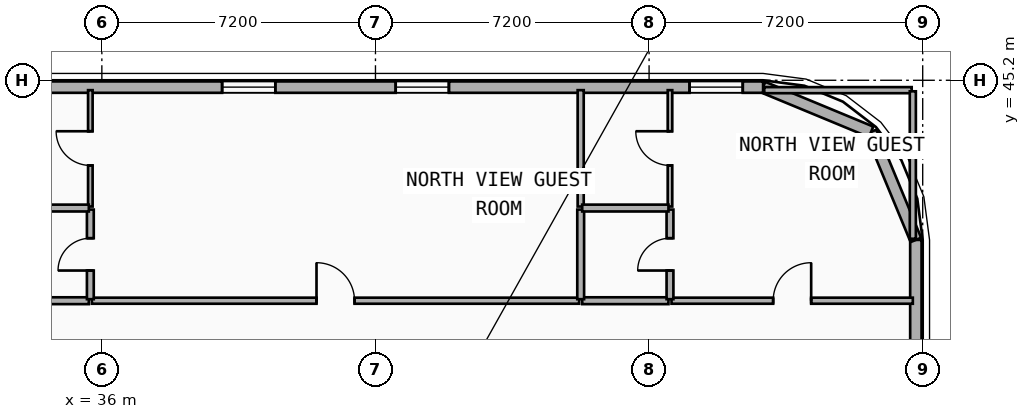
"""IFC4 building model, lengths in metres.
Left out: names, types, materials, properties, quantities, classifications, styles, units other than length and angle.
Written with IfcOpenShell. Run it as: python <this file> out.ifc"""

import sys

from ifc_helpers import new_model, si_unit, direction, frame, frame_2d, origin, place, context, subcontext, project, spatial, rectangle, extrude, element, fill, save


model = new_model("IFC4")
c1 = context("Model", 3, precision=1e-05, world=origin(), true_north=direction((0.0, 1.0)))
c2 = subcontext(c1, "Body", "Model", "MODEL_VIEW")
j1 = project(units=[si_unit("LENGTHUNIT", "METRE"), si_unit("PLANEANGLEUNIT", "RADIAN")], contexts=[c1])
p1 = place(None, origin())
s1 = spatial("IfcSite", under=j1, at=p1, CompositionType="ELEMENT")
p2 = place(p1, origin())
s2 = spatial("IfcBuilding", under=s1, at=p2, CompositionType="ELEMENT")
p3 = place(p2, frame((0.0, 0.0, 53.5)))
s3 = spatial("IfcBuildingStorey", under=s2, at=p3, CompositionType="ELEMENT", Elevation=53.5)
p4 = place(p3, frame((57.42, 41.0, 0.0), z_axis=(0.0, 0.0, 1.0), x_axis=(0.0, -1.0, 0.0)))
e1 = element("IfcWall", 1, at=p4, inside=s3, PredefinedType="SOLIDWALL", context=c2, shape_type="SweptSolid", body=[
    extrude(rectangle(XDim=15.2, YDim=0.3, at=frame_2d((7.6, 0.0))), origin(), (0.0, 0.0, 1.0), 3.24),
])
p5 = place(p4, frame((10.882, 0.0, 0.48)))
e2 = element("IfcOpeningElement", 2, at=p5, cuts=e1, PredefinedType="OPENING", context=c2, shape_type="SweptSolid", body=[
    extrude(rectangle(XDim=1.4, YDim=1.8, at=frame_2d((0.7, 0.9))), frame((0.0, 0.16, 0.0), z_axis=(0.0, -1.0, 0.0), x_axis=(1.0, 0.0, 0.0)), (0.0, 0.0, 1.0), 0.32),
])
p6 = place(p4, frame((5.621, 0.0, 0.48)))
e3 = element("IfcOpeningElement", 3, at=p6, cuts=e1, PredefinedType="OPENING", context=c2, shape_type="SweptSolid", body=[
    extrude(rectangle(XDim=1.4, YDim=1.8, at=frame_2d((0.7, 0.9))), frame((0.0, 0.16, 0.0), z_axis=(0.0, -1.0, 0.0), x_axis=(1.0, 0.0, 0.0)), (0.0, 0.0, 1.0), 0.32),
])
p7 = place(p3, frame((56.243, 43.843, 0.0), z_axis=(0.0, 0.0, 1.0), x_axis=(0.382636798336, -0.92389884758, 0.0)))
e4 = element("IfcWall", 4, at=p7, inside=s3, PredefinedType="SOLIDWALL", context=c2, shape_type="SweptSolid", body=[
    extrude(rectangle(XDim=3.077, YDim=0.3, at=frame_2d((1.538, 0.0))), origin(), (0.0, 0.0, 1.0), 3.24),
])
p8 = place(p3, frame((53.4, 45.02, 0.0), z_axis=(0.0, 0.0, 1.0), x_axis=(0.923882414032, -0.382676475685, 0.0)))
e5 = element("IfcWall", 5, at=p8, inside=s3, PredefinedType="SOLIDWALL", context=c2, shape_type="SweptSolid", body=[
    extrude(rectangle(XDim=3.077, YDim=0.3, at=frame_2d((1.539, 0.0))), origin(), (0.0, 0.0, 1.0), 3.24),
])
p9 = place(p3, frame((4.2, 45.02, 0.0), z_axis=(0.0, 0.0, 1.0), x_axis=(1.0, 0.0, 0.0)))
e6 = element("IfcWall", 6, at=p9, inside=s3, PredefinedType="SOLIDWALL", context=c2, shape_type="SweptSolid", body=[
    extrude(rectangle(XDim=49.2, YDim=0.3, at=frame_2d((24.6, 0.0))), origin(), (0.0, 0.0, 1.0), 3.24),
])
p10 = place(p9, frame((8.99, 0.0, 0.85)))
e7 = element("IfcOpeningElement", 7, at=p10, cuts=e6, PredefinedType="OPENING", context=c2, shape_type="SweptSolid", body=[
    extrude(rectangle(XDim=1.4, YDim=1.8, at=frame_2d((0.7, 0.9))), frame((0.0, 0.16, 0.0), z_axis=(0.0, -1.0, 0.0), x_axis=(1.0, 0.0, 0.0)), (0.0, 0.0, 1.0), 0.32),
])
p11 = place(p9, frame((11.72, 0.0, 0.85)))
e8 = element("IfcOpeningElement", 8, at=p11, cuts=e6, PredefinedType="OPENING", context=c2, shape_type="SweptSolid", body=[
    extrude(rectangle(XDim=1.4, YDim=1.8, at=frame_2d((0.7, 0.9))), frame((0.0, 0.16, 0.0), z_axis=(0.0, -1.0, 0.0), x_axis=(1.0, 0.0, 0.0)), (0.0, 0.0, 1.0), 0.32),
])
p12 = place(p9, frame((19.499, 0.0, 0.85)))
e9 = element("IfcOpeningElement", 9, at=p12, cuts=e6, PredefinedType="OPENING", context=c2, shape_type="SweptSolid", body=[
    extrude(rectangle(XDim=1.4, YDim=1.8, at=frame_2d((0.7, 0.9))), frame((0.0, 0.16, 0.0), z_axis=(0.0, -1.0, 0.0), x_axis=(1.0, 0.0, 0.0)), (0.0, 0.0, 1.0), 0.32),
])
p13 = place(p9, frame((22.998, 0.0, 0.85)))
e10 = element("IfcOpeningElement", 10, at=p13, cuts=e6, PredefinedType="OPENING", context=c2, shape_type="SweptSolid", body=[
    extrude(rectangle(XDim=1.4, YDim=1.8, at=frame_2d((0.7, 0.9))), frame((0.0, 0.16, 0.0), z_axis=(0.0, -1.0, 0.0), x_axis=(1.0, 0.0, 0.0)), (0.0, 0.0, 1.0), 0.32),
])
p14 = place(p9, frame((34.965, 0.0, 0.85)))
e11 = element("IfcOpeningElement", 11, at=p14, cuts=e6, PredefinedType="OPENING", context=c2, shape_type="SweptSolid", body=[
    extrude(rectangle(XDim=1.4, YDim=1.8, at=frame_2d((0.7, 0.9))), frame((0.0, 0.16, 0.0), z_axis=(0.0, -1.0, 0.0), x_axis=(1.0, 0.0, 0.0)), (0.0, 0.0, 1.0), 0.32),
])
p15 = place(p9, frame((39.532, 0.0, 0.85)))
e12 = element("IfcOpeningElement", 12, at=p15, cuts=e6, PredefinedType="OPENING", context=c2, shape_type="SweptSolid", body=[
    extrude(rectangle(XDim=1.4, YDim=1.8, at=frame_2d((0.7, 0.9))), frame((0.0, 0.16, 0.0), z_axis=(0.0, -1.0, 0.0), x_axis=(1.0, 0.0, 0.0)), (0.0, 0.0, 1.0), 0.32),
])
p16 = place(p9, frame((47.265, 0.0, 0.85)))
e13 = element("IfcOpeningElement", 13, at=p16, cuts=e6, PredefinedType="OPENING", context=c2, shape_type="SweptSolid", body=[
    extrude(rectangle(XDim=1.4, YDim=1.8, at=frame_2d((0.7, 0.9))), frame((0.0, 0.16, 0.0), z_axis=(0.0, -1.0, 0.0), x_axis=(1.0, 0.0, 0.0)), (0.0, 0.0, 1.0), 0.32),
])
p17 = place(p3, frame((35.737, 39.4, 0.0), z_axis=(0.0, 0.0, 1.0), x_axis=(1.0, 0.0, 0.0)))
e14 = element("IfcWall", 14, at=p17, inside=s3, PredefinedType="PARTITIONING", context=c2, shape_type="SweptSolid", body=[
    extrude(rectangle(XDim=12.823, YDim=0.16, at=frame_2d((6.412, 0.0))), origin(), (0.0, 0.0, 1.0), 3.24),
])
p18 = place(p17, frame((5.912, 0.0, 0.0)))
e15 = element("IfcOpeningElement", 15, at=p18, cuts=e14, PredefinedType="OPENING", context=c2, shape_type="SweptSolid", body=[
    extrude(rectangle(XDim=1.0, YDim=2.15, at=frame_2d((0.5, 1.075))), frame((0.0, 0.09, 0.0), z_axis=(0.0, -1.0, 0.0), x_axis=(1.0, 0.0, 0.0)), (0.0, 0.0, 1.0), 0.18),
])
p19 = place(p3, frame((33.387, 39.4, 0.0), z_axis=(0.0, 0.0, 1.0), x_axis=(1.0, 0.0, 0.0)))
e16 = element("IfcWall", 16, at=p19, inside=s3, PredefinedType="PLUMBINGWALL", context=c2, shape_type="SweptSolid", body=[
    extrude(rectangle(XDim=2.27, YDim=0.18, at=frame_2d((1.135, 0.0))), origin(), (0.0, 0.0, 1.0), 3.24),
])
p20 = place(p3, frame((50.99, 39.4, 0.0), z_axis=(0.0, 0.0, 1.0), x_axis=(1.0, 0.0, 0.0)))
e17 = element("IfcWall", 17, at=p20, inside=s3, PredefinedType="PARTITIONING", context=c2, shape_type="SweptSolid", body=[
    extrude(rectangle(XDim=6.35, YDim=0.16, at=frame_2d((3.175, 0.0))), origin(), (0.0, 0.0, 1.0), 3.24),
])
p21 = place(p20, frame((2.675, 0.0, 0.0)))
e18 = element("IfcOpeningElement", 18, at=p21, cuts=e17, PredefinedType="OPENING", context=c2, shape_type="SweptSolid", body=[
    extrude(rectangle(XDim=1.0, YDim=2.15, at=frame_2d((0.5, 1.075))), frame((0.0, 0.09, 0.0), z_axis=(0.0, -1.0, 0.0), x_axis=(1.0, 0.0, 0.0)), (0.0, 0.0, 1.0), 0.18),
])
p22 = place(p3, frame((48.64, 39.4, 0.0), z_axis=(0.0, 0.0, 1.0), x_axis=(1.0, 0.0, 0.0)))
e19 = element("IfcWall", 19, at=p22, inside=s3, PredefinedType="PLUMBINGWALL", context=c2, shape_type="SweptSolid", body=[
    extrude(rectangle(XDim=2.27, YDim=0.18, at=frame_2d((1.135, 0.0))), origin(), (0.0, 0.0, 1.0), 3.24),
])
p23 = place(p3, frame((35.697, 39.44, 0.0), z_axis=(0.0, 0.0, 1.0), x_axis=(0.0, 1.0, 0.0)))
e20 = element("IfcWall", 20, at=p23, inside=s3, PredefinedType="PLUMBINGWALL", context=c2, shape_type="SweptSolid", body=[
    extrude(rectangle(XDim=2.358, YDim=0.18, at=frame_2d((1.179, 0.0))), origin(), (0.0, 0.0, 1.0), 3.24),
])
p24 = place(p23, frame((0.754, 0.0, 0.0)))
e21 = element("IfcOpeningElement", 21, at=p24, cuts=e20, PredefinedType="OPENING", context=c2, shape_type="SweptSolid", body=[
    extrude(rectangle(XDim=0.85, YDim=2.1, at=frame_2d((0.425, 1.05))), frame((0.0, 0.1, 0.0), z_axis=(0.0, -1.0, 0.0), x_axis=(1.0, 0.0, 0.0)), (0.0, 0.0, 1.0), 0.2),
])
p25 = place(p3, frame((35.697, 41.878, 0.0), z_axis=(0.0, 0.0, 1.0), x_axis=(0.0, 1.0, 0.0)))
e22 = element("IfcWall", 22, at=p25, inside=s3, PredefinedType="PARTITIONING", context=c2, shape_type="SweptSolid", body=[
    extrude(rectangle(XDim=3.062, YDim=0.12, at=frame_2d((1.531, 0.0))), origin(), (0.0, 0.0, 1.0), 3.24),
])
p26 = place(p25, frame((1.081, 0.0, 0.0)))
e23 = element("IfcOpeningElement", 23, at=p26, cuts=e22, PredefinedType="OPENING", context=c2, shape_type="SweptSolid", body=[
    extrude(rectangle(XDim=0.9, YDim=2.1, at=frame_2d((0.45, 1.05))), frame((0.0, 0.07, 0.0), z_axis=(0.0, -1.0, 0.0), x_axis=(1.0, 0.0, 0.0)), (0.0, 0.0, 1.0), 0.14),
])
p27 = place(p3, frame((48.6, 39.44, 0.0), z_axis=(0.0, 0.0, 1.0), x_axis=(0.0, 1.0, 0.0)))
e24 = element("IfcWall", 24, at=p27, inside=s3, PredefinedType="PLUMBINGWALL", context=c2, shape_type="SweptSolid", body=[
    extrude(rectangle(XDim=2.358, YDim=0.18, at=frame_2d((1.179, 0.0))), origin(), (0.0, 0.0, 1.0), 3.24),
])
p28 = place(p3, frame((48.6, 41.878, 0.0), z_axis=(0.0, 0.0, 1.0), x_axis=(0.0, 1.0, 0.0)))
e25 = element("IfcWall", 25, at=p28, inside=s3, PredefinedType="PARTITIONING", context=c2, shape_type="SweptSolid", body=[
    extrude(rectangle(XDim=3.062, YDim=0.16, at=frame_2d((1.531, 0.0))), origin(), (0.0, 0.0, 1.0), 3.24),
])
p29 = place(p3, frame((33.387, 41.838, 0.0), z_axis=(0.0, 0.0, 1.0), x_axis=(1.0, 0.0, 0.0)))
e26 = element("IfcWall", 26, at=p29, inside=s3, PredefinedType="PLUMBINGWALL", context=c2, shape_type="SweptSolid", body=[
    extrude(rectangle(XDim=2.27, YDim=0.18, at=frame_2d((1.135, 0.0))), origin(), (0.0, 0.0, 1.0), 3.24),
])
p30 = place(p3, frame((50.95, 39.44, 0.0), z_axis=(0.0, 0.0, 1.0), x_axis=(0.0, 1.0, 0.0)))
e27 = element("IfcWall", 27, at=p30, inside=s3, PredefinedType="PLUMBINGWALL", context=c2, shape_type="SweptSolid", body=[
    extrude(rectangle(XDim=2.358, YDim=0.18, at=frame_2d((1.179, 0.0))), origin(), (0.0, 0.0, 1.0), 3.24),
])
p31 = place(p30, frame((0.754, 0.0, 0.0)))
e28 = element("IfcOpeningElement", 28, at=p31, cuts=e27, PredefinedType="OPENING", context=c2, shape_type="SweptSolid", body=[
    extrude(rectangle(XDim=0.85, YDim=2.1, at=frame_2d((0.425, 1.05))), frame((0.0, 0.1, 0.0), z_axis=(0.0, -1.0, 0.0), x_axis=(1.0, 0.0, 0.0)), (0.0, 0.0, 1.0), 0.2),
])
p32 = place(p3, frame((50.95, 41.878, 0.0), z_axis=(0.0, 0.0, 1.0), x_axis=(0.0, 1.0, 0.0)))
e29 = element("IfcWall", 29, at=p32, inside=s3, PredefinedType="PARTITIONING", context=c2, shape_type="SweptSolid", body=[
    extrude(rectangle(XDim=3.062, YDim=0.12, at=frame_2d((1.531, 0.0))), origin(), (0.0, 0.0, 1.0), 3.24),
])
p33 = place(p32, frame((1.081, 0.0, 0.0)))
e30 = element("IfcOpeningElement", 30, at=p33, cuts=e29, PredefinedType="OPENING", context=c2, shape_type="SweptSolid", body=[
    extrude(rectangle(XDim=0.9, YDim=2.1, at=frame_2d((0.45, 1.05))), frame((0.0, 0.07, 0.0), z_axis=(0.0, -1.0, 0.0), x_axis=(1.0, 0.0, 0.0)), (0.0, 0.0, 1.0), 0.14),
])
p34 = place(p3, frame((48.64, 41.838, 0.0), z_axis=(0.0, 0.0, 1.0), x_axis=(1.0, 0.0, 0.0)))
e31 = element("IfcWall", 31, at=p34, inside=s3, PredefinedType="PLUMBINGWALL", context=c2, shape_type="SweptSolid", body=[
    extrude(rectangle(XDim=2.27, YDim=0.18, at=frame_2d((1.135, 0.0))), origin(), (0.0, 0.0, 1.0), 3.24),
])
p35 = place(p3, frame((53.43, 44.94, 0.0), z_axis=(0.0, 0.0, 1.0), x_axis=(1.0, 0.0, 0.0)))
e32 = element("IfcWall", 32, at=p35, inside=s3, PredefinedType="PARTITIONING", context=c2, shape_type="SweptSolid", body=[
    extrude(rectangle(XDim=3.88, YDim=0.16, at=frame_2d((1.94, 0.0))), origin(), (0.0, 0.0, 1.0), 3.24),
])
p36 = place(p3, frame((57.34, 41.03, 0.0), z_axis=(0.0, 0.0, 1.0), x_axis=(0.0, 1.0, 0.0)))
e33 = element("IfcWall", 33, at=p36, inside=s3, PredefinedType="PARTITIONING", context=c2, shape_type="SweptSolid", body=[
    extrude(rectangle(XDim=3.88, YDim=0.16, at=frame_2d((1.94, 0.0))), origin(), (0.0, 0.0, 1.0), 3.24),
])
p37 = place(p14, origin())
e34 = element("IfcWindow", 34, at=p37, inside=s3, PartitioningType="SINGLE_PANEL", PredefinedType="WINDOW", context=c2, shape_type="SweptSolid", body=[
    extrude(rectangle(XDim=1.4, YDim=1.8, at=frame_2d((0.7, 0.9))), frame((0.0, 0.03, 0.0), z_axis=(0.0, -1.0, 0.0), x_axis=(1.0, 0.0, 0.0)), (0.0, 0.0, 1.0), 0.06),
])
fill(e11, e34)
p38 = place(p15, origin())
e35 = element("IfcWindow", 35, at=p38, inside=s3, PartitioningType="SINGLE_PANEL", PredefinedType="WINDOW", context=c2, shape_type="SweptSolid", body=[
    extrude(rectangle(XDim=1.4, YDim=1.8, at=frame_2d((0.7, 0.9))), frame((0.0, 0.03, 0.0), z_axis=(0.0, -1.0, 0.0), x_axis=(1.0, 0.0, 0.0)), (0.0, 0.0, 1.0), 0.06),
])
fill(e12, e35)
p39 = place(p16, origin())
e36 = element("IfcWindow", 36, at=p39, inside=s3, PartitioningType="SINGLE_PANEL", PredefinedType="WINDOW", context=c2, shape_type="SweptSolid", body=[
    extrude(rectangle(XDim=1.4, YDim=1.8, at=frame_2d((0.7, 0.9))), frame((0.0, 0.03, 0.0), z_axis=(0.0, -1.0, 0.0), x_axis=(1.0, 0.0, 0.0)), (0.0, 0.0, 1.0), 0.06),
])
fill(e13, e36)
p40 = place(p18, origin())
e37 = element("IfcDoor", 37, at=p40, inside=s3, OperationType="SINGLE_SWING_LEFT", PredefinedType="DOOR", context=c2, shape_type="SweptSolid", body=[
    extrude(rectangle(XDim=1.0, YDim=2.15, at=frame_2d((0.5, 1.075))), frame((0.0, 0.025, 0.0), z_axis=(0.0, -1.0, 0.0), x_axis=(1.0, 0.0, 0.0)), (0.0, 0.0, 1.0), 0.05),
])
fill(e15, e37)
p41 = place(p21, origin())
e38 = element("IfcDoor", 38, at=p41, inside=s3, OperationType="SINGLE_SWING_RIGHT", PredefinedType="DOOR", context=c2, shape_type="SweptSolid", body=[
    extrude(rectangle(XDim=1.0, YDim=2.15, at=frame_2d((0.5, 1.075))), frame((0.0, 0.025, 0.0), z_axis=(0.0, -1.0, 0.0), x_axis=(1.0, 0.0, 0.0)), (0.0, 0.0, 1.0), 0.05),
])
fill(e18, e38)
p42 = place(p24, origin())
e39 = element("IfcDoor", 39, at=p42, inside=s3, OperationType="SINGLE_SWING_LEFT", PredefinedType="DOOR", context=c2, shape_type="SweptSolid", body=[
    extrude(rectangle(XDim=0.85, YDim=2.1, at=frame_2d((0.425, 1.05))), frame((0.0, 0.025, 0.0), z_axis=(0.0, -1.0, 0.0), x_axis=(1.0, 0.0, 0.0)), (0.0, 0.0, 1.0), 0.05),
])
fill(e21, e39)
p43 = place(p26, origin())
e40 = element("IfcDoor", 40, at=p43, inside=s3, OperationType="SINGLE_SWING_RIGHT", PredefinedType="DOOR", context=c2, shape_type="SweptSolid", body=[
    extrude(rectangle(XDim=0.9, YDim=2.1, at=frame_2d((0.45, 1.05))), frame((0.0, 0.025, 0.0), z_axis=(0.0, -1.0, 0.0), x_axis=(1.0, 0.0, 0.0)), (0.0, 0.0, 1.0), 0.05),
])
fill(e23, e40)
p44 = place(p31, origin())
e41 = element("IfcDoor", 41, at=p44, inside=s3, OperationType="SINGLE_SWING_LEFT", PredefinedType="DOOR", context=c2, shape_type="SweptSolid", body=[
    extrude(rectangle(XDim=0.85, YDim=2.1, at=frame_2d((0.425, 1.05))), frame((0.0, 0.025, 0.0), z_axis=(0.0, -1.0, 0.0), x_axis=(1.0, 0.0, 0.0)), (0.0, 0.0, 1.0), 0.05),
])
fill(e28, e41)
p45 = place(p33, origin())
e42 = element("IfcDoor", 42, at=p45, inside=s3, OperationType="SINGLE_SWING_RIGHT", PredefinedType="DOOR", context=c2, shape_type="SweptSolid", body=[
    extrude(rectangle(XDim=0.9, YDim=2.1, at=frame_2d((0.45, 1.05))), frame((0.0, 0.025, 0.0), z_axis=(0.0, -1.0, 0.0), x_axis=(1.0, 0.0, 0.0)), (0.0, 0.0, 1.0), 0.05),
])
fill(e30, e42)
save(model, sys.argv[1])
